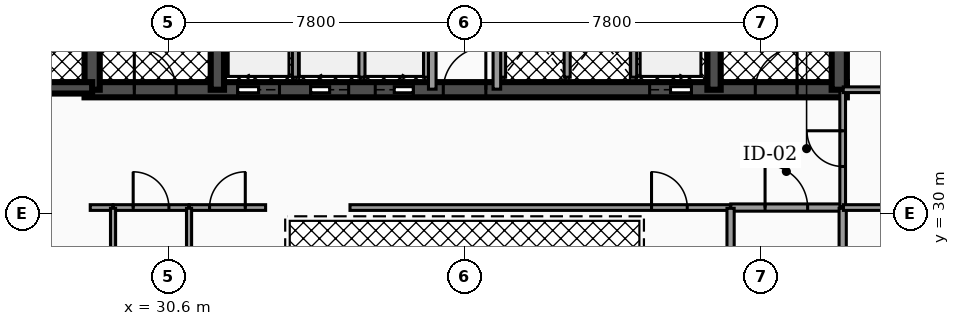
"""IFC4 building model, lengths in metres.
Left out: names, types, materials, properties, quantities, classifications, styles, units other than length and angle.
Written with IfcOpenShell. Run it as: python <this file> out.ifc"""

import sys

from ifc_helpers import new_model, si_unit, direction, frame, frame_2d, origin, place, context, subcontext, project, spatial, rectangle, extrude, element, fill, save


model = new_model("IFC4")
c1 = context("Model", 3, precision=1e-05, world=origin(), true_north=direction((0.0, 1.0)))
c2 = subcontext(c1, "Body", "Model", "MODEL_VIEW")
j1 = project(units=[si_unit("LENGTHUNIT", "METRE"), si_unit("PLANEANGLEUNIT", "RADIAN")], contexts=[c1])
p1 = place(None, origin())
s1 = spatial("IfcSite", under=j1, at=p1, CompositionType="ELEMENT")
p2 = place(p1, origin())
s2 = spatial("IfcBuilding", under=s1, at=p2, CompositionType="ELEMENT")
p3 = place(p2, frame((0.0, 0.0, 127.16)))
s3 = spatial("IfcBuildingStorey", under=s2, at=p3, CompositionType="ELEMENT", Elevation=127.16)
p4 = place(p3, frame((28.4, 33.25, 0.0), z_axis=(0.0, 0.0, 1.0), x_axis=(1.0, 0.0, 0.0)))
e1 = element("IfcWall", 1, at=p4, inside=s3, PredefinedType="SHEAR", context=c2, shape_type="SweptSolid", body=[
    extrude(rectangle(XDim=20.06, YDim=0.4, at=frame_2d((10.03, 0.0))), origin(), (0.0, 0.0, 1.0), 3.5),
])
p5 = place(p4, frame((4.03, 0.0, 0.0)))
e2 = element("IfcOpeningElement", 2, at=p5, cuts=e1, PredefinedType="OPENING", context=c2, shape_type="SweptSolid", body=[
    extrude(rectangle(XDim=1.1, YDim=2.15, at=frame_2d((0.55, 1.075))), frame((0.0, 0.21, 0.0), z_axis=(0.0, -1.0, 0.0), x_axis=(1.0, 0.0, 0.0)), (0.0, 0.0, 1.0), 0.42),
])
p6 = place(p4, frame((14.87, 0.0, 0.0)))
e3 = element("IfcOpeningElement", 3, at=p6, cuts=e1, PredefinedType="OPENING", context=c2, shape_type="SweptSolid", body=[
    extrude(rectangle(XDim=1.1, YDim=2.15, at=frame_2d((0.55, 1.075))), frame((0.0, 0.21, 0.0), z_axis=(0.0, -1.0, 0.0), x_axis=(1.0, 0.0, 0.0)), (0.0, 0.0, 1.0), 0.42),
])
p7 = place(p4, frame((5.95, 0.0, 0.0)))
e4 = element("IfcOpeningElement", 4, at=p7, cuts=e1, PredefinedType="OPENING", context=c2, shape_type="SweptSolid", body=[
    extrude(rectangle(XDim=1.0, YDim=2.1, at=frame_2d((0.5, 1.05))), frame((0.0, 0.21, 0.0), z_axis=(0.0, -1.0, 0.0), x_axis=(1.0, 0.0, 0.0)), (0.0, 0.0, 1.0), 0.42),
])
p8 = place(p4, frame((7.65, 0.0, 0.0)))
e5 = element("IfcOpeningElement", 5, at=p8, cuts=e1, PredefinedType="OPENING", context=c2, shape_type="SweptSolid", body=[
    extrude(rectangle(XDim=1.0, YDim=2.1, at=frame_2d((0.5, 1.05))), frame((0.0, 0.21, 0.0), z_axis=(0.0, -1.0, 0.0), x_axis=(1.0, 0.0, 0.0)), (0.0, 0.0, 1.0), 0.42),
])
p9 = place(p4, frame((1.31, 0.0, 0.0)))
e6 = element("IfcOpeningElement", 6, at=p9, cuts=e1, PredefinedType="OPENING", context=c2, shape_type="SweptSolid", body=[
    extrude(rectangle(XDim=1.1, YDim=2.2, at=frame_2d((0.55, 1.1))), frame((0.0, 0.21, 0.0), z_axis=(0.0, -1.0, 0.0), x_axis=(1.0, 0.0, 0.0)), (0.0, 0.0, 1.0), 0.42),
])
p10 = place(p4, frame((9.44, 0.0, 0.0)))
e7 = element("IfcOpeningElement", 7, at=p10, cuts=e1, PredefinedType="OPENING", context=c2, shape_type="SweptSolid", body=[
    extrude(rectangle(XDim=1.12, YDim=2.05, at=frame_2d((0.56, 1.025))), frame((0.0, 0.21, 0.0), z_axis=(0.0, -1.0, 0.0), x_axis=(1.0, 0.0, 0.0)), (0.0, 0.0, 1.0), 0.42),
])
p11 = place(p4, frame((17.65, 0.0, 0.0)))
e8 = element("IfcOpeningElement", 8, at=p11, cuts=e1, PredefinedType="OPENING", context=c2, shape_type="SweptSolid", body=[
    extrude(rectangle(XDim=1.1, YDim=2.2, at=frame_2d((0.55, 1.1))), frame((0.0, 0.21, 0.0), z_axis=(0.0, -1.0, 0.0), x_axis=(1.0, 0.0, 0.0)), (0.0, 0.0, 1.0), 0.42),
])
p12 = place(p3, frame((28.6, 33.25, 0.0), z_axis=(0.0, 0.0, 1.0), x_axis=(0.0, 1.0, 0.0)))
e9 = element("IfcWall", 9, at=p12, inside=s3, PredefinedType="SHEAR", context=c2, shape_type="SweptSolid", body=[
    extrude(rectangle(XDim=10.2, YDim=0.4, at=frame_2d((5.1, 0.0))), origin(), (0.0, 0.0, 1.0), 3.5),
])
for number, where, z_axis, x_axis in (
    (10, (31.895, 33.25, 0.0), (0.0, 0.0, 1.0), (0.0, 1.0, 0.0)),
    (11, (44.965, 33.25, 0.0), (0.0, 0.0, 1.0), (0.0, 1.0, 0.0)),
):
    element("IfcWall", number, at=place(p3, frame(where, z_axis=z_axis, x_axis=x_axis)), inside=s3, PredefinedType="SHEAR", context=c2, shape_type="SweptSolid", body=[
        extrude(rectangle(XDim=10.2, YDim=0.35, at=frame_2d((5.1, 0.0))), origin(), (0.0, 0.0, 1.0), 3.5),
    ])
p13 = place(p3, frame((48.26, 33.25, 0.0), z_axis=(0.0, 0.0, 1.0), x_axis=(0.0, 1.0, 0.0)))
e12 = element("IfcWall", 12, at=p13, inside=s3, PredefinedType="SHEAR", context=c2, shape_type="SweptSolid", body=[
    extrude(rectangle(XDim=10.2, YDim=0.4, at=frame_2d((5.1, 0.0))), origin(), (0.0, 0.0, 1.0), 3.5),
])
p14 = place(p3, frame((25.08, 33.3, 0.0), z_axis=(0.0, 0.0, 1.0), x_axis=(1.0, 0.0, 0.0)))
e13 = element("IfcWall", 13, at=p14, inside=s3, PredefinedType="SHEAR", context=c2, shape_type="SweptSolid", body=[
    extrude(rectangle(XDim=3.52, YDim=0.3, at=frame_2d((1.76, 0.0))), origin(), (0.0, 0.0, 1.0), 3.5),
])
p15 = place(p14, frame((1.335, 0.0, 0.0)))
e14 = element("IfcOpeningElement", 14, at=p15, cuts=e13, PredefinedType="OPENING", context=c2, shape_type="SweptSolid", body=[
    extrude(rectangle(XDim=0.95, YDim=2.2, at=frame_2d((0.475, 1.1))), frame((0.0, 0.16, 0.0), z_axis=(0.0, -1.0, 0.0), x_axis=(1.0, 0.0, 0.0)), (0.0, 0.0, 1.0), 0.32),
])
for number, where, z_axis, x_axis in (
    (15, (33.95, 33.58, 0.0), (0.0, 0.0, 1.0), (0.0, 1.0, 0.0)),
    (16, (42.85, 33.58, 0.0), (0.0, 0.0, 1.0), (0.0, 1.0, 0.0)),
):
    element("IfcWall", number, at=place(p3, frame(where, z_axis=z_axis, x_axis=x_axis)), inside=s3, PredefinedType="SOLIDWALL", context=c2, shape_type="SweptSolid", body=[
        extrude(rectangle(XDim=2.45, YDim=0.16, at=frame_2d((1.225, 0.0))), origin(), (0.0, 0.0, 1.0), 2.472),
    ])
for number, where, z_axis, x_axis in (
    (17, (35.7, 33.58, 0.0), (0.0, 0.0, 1.0), (0.0, 1.0, 0.0)),
    (18, (37.4, 33.58, 0.0), (0.0, 0.0, 1.0), (0.0, 1.0, 0.0)),
    (19, (39.4, 33.58, 0.0), (0.0, 0.0, 1.0), (0.0, 1.0, 0.0)),
    (20, (41.1, 33.58, 0.0), (0.0, 0.0, 1.0), (0.0, 1.0, 0.0)),
):
    element("IfcWall", number, at=place(p3, frame(where, z_axis=z_axis, x_axis=x_axis)), inside=s3, PredefinedType="SOLIDWALL", context=c2, shape_type="SweptSolid", body=[
        extrude(rectangle(XDim=2.25, YDim=0.16, at=frame_2d((1.125, 0.0))), origin(), (0.0, 0.0, 1.0), 2.472),
    ])
p16 = place(p3, frame((37.55, 33.265, 0.0), z_axis=(0.0, 0.0, 1.0), x_axis=(0.0, 1.0, 0.0)))
e21 = element("IfcWall", 21, at=p16, inside=s3, PredefinedType="PARTITIONING", context=c2, shape_type="SweptSolid", body=[
    extrude(rectangle(XDim=4.265, YDim=0.2, at=frame_2d((2.133, 0.0))), origin(), (0.0, 0.0, 1.0), 2.457),
])
p17 = place(p16, frame((3.093, 0.0, 0.0)))
e22 = element("IfcOpeningElement", 22, at=p17, cuts=e21, PredefinedType="OPENING", context=c2, shape_type="SweptSolid", body=[
    extrude(rectangle(XDim=0.88, YDim=2.05, at=frame_2d((0.44, 1.025))), frame((0.0, 0.11, 0.0), z_axis=(0.0, -1.0, 0.0), x_axis=(1.0, 0.0, 0.0)), (0.0, 0.0, 1.0), 0.22),
])
p18 = place(p3, frame((39.25, 33.265, 0.0), z_axis=(0.0, 0.0, 1.0), x_axis=(0.0, 1.0, 0.0)))
e23 = element("IfcWall", 23, at=p18, inside=s3, PredefinedType="PARTITIONING", context=c2, shape_type="SweptSolid", body=[
    extrude(rectangle(XDim=4.265, YDim=0.2, at=frame_2d((2.133, 0.0))), origin(), (0.0, 0.0, 1.0), 2.457),
])
p19 = place(p18, frame((3.093, 0.0, 0.0)))
e24 = element("IfcOpeningElement", 24, at=p19, cuts=e23, PredefinedType="OPENING", context=c2, shape_type="SweptSolid", body=[
    extrude(rectangle(XDim=0.88, YDim=2.05, at=frame_2d((0.44, 1.025))), frame((0.0, 0.11, 0.0), z_axis=(0.0, -1.0, 0.0), x_axis=(1.0, 0.0, 0.0)), (0.0, 0.0, 1.0), 0.22),
])
p20 = place(p3, frame((45.405, 30.15, 0.0), z_axis=(0.0, 0.0, 1.0), x_axis=(1.0, 0.0, 0.0)))
e25 = element("IfcWall", 25, at=p20, inside=s3, PredefinedType="PARTITIONING", context=c2, shape_type="SweptSolid", body=[
    extrude(rectangle(XDim=2.925, YDim=0.19, at=frame_2d((1.462, 0.0))), origin(), (0.0, 0.0, 1.0), 2.457),
])
p21 = place(p20, frame((0.903, 0.0, 0.0)))
e26 = element("IfcOpeningElement", 26, at=p21, cuts=e25, PredefinedType="OPENING", context=c2, shape_type="SweptSolid", body=[
    extrude(rectangle(XDim=1.12, YDim=2.05, at=frame_2d((0.56, 1.025))), frame((0.0, 0.105, 0.0), z_axis=(0.0, -1.0, 0.0), x_axis=(1.0, 0.0, 0.0)), (0.0, 0.0, 1.0), 0.21),
])
p22 = place(p3, frame((48.35, 30.17, 0.0), z_axis=(0.0, 0.0, 1.0), x_axis=(0.0, 1.0, 0.0)))
e27 = element("IfcWall", 27, at=p22, inside=s3, PredefinedType="PARTITIONING", context=c2, shape_type="SweptSolid", body=[
    extrude(rectangle(XDim=3.06, YDim=0.15, at=frame_2d((1.53, 0.0))), origin(), (0.0, 0.0, 1.0), 2.457),
])
p23 = place(p22, frame((1.06, 0.0, 0.0)))
e28 = element("IfcOpeningElement", 28, at=p23, cuts=e27, PredefinedType="OPENING", context=c2, shape_type="SweptSolid", body=[
    extrude(rectangle(XDim=0.94, YDim=2.05, at=frame_2d((0.47, 1.025))), frame((0.0, 0.085, 0.0), z_axis=(0.0, -1.0, 0.0), x_axis=(1.0, 0.0, 0.0)), (0.0, 0.0, 1.0), 0.17),
])
p24 = place(p3, frame((28.55, 30.15, 0.0), z_axis=(0.0, 0.0, 1.0), x_axis=(1.0, 0.0, 0.0)))
e29 = element("IfcWall", 29, at=p24, inside=s3, PredefinedType="PARTITIONING", context=c2, shape_type="SweptSolid", body=[
    extrude(rectangle(XDim=0.595, YDim=0.15, at=frame_2d((0.297, 0.0))), origin(), (0.0, 0.0, 1.0), 2.457),
])
p25 = place(p3, frame((29.155, 30.15, 0.0), z_axis=(0.0, 0.0, 1.0), x_axis=(1.0, 0.0, 0.0)))
e30 = element("IfcWall", 30, at=p25, inside=s3, PredefinedType="PARTITIONING", context=c2, shape_type="SweptSolid", body=[
    extrude(rectangle(XDim=1.99, YDim=0.15, at=frame_2d((0.995, 0.0))), origin(), (0.0, 0.0, 1.0), 2.457),
])
p26 = place(p25, frame((0.525, 0.0, 0.0)))
e31 = element("IfcOpeningElement", 31, at=p26, cuts=e30, PredefinedType="OPENING", context=c2, shape_type="SweptSolid", body=[
    extrude(rectangle(XDim=0.94, YDim=2.05, at=frame_2d((0.47, 1.025))), frame((0.0, 0.085, 0.0), z_axis=(0.0, -1.0, 0.0), x_axis=(1.0, 0.0, 0.0)), (0.0, 0.0, 1.0), 0.17),
])
p27 = place(p3, frame((31.155, 30.15, 0.0), z_axis=(0.0, 0.0, 1.0), x_axis=(1.0, 0.0, 0.0)))
e32 = element("IfcWall", 32, at=p27, inside=s3, PredefinedType="PARTITIONING", context=c2, shape_type="SweptSolid", body=[
    extrude(rectangle(XDim=2.01, YDim=0.15, at=frame_2d((1.005, 0.0))), origin(), (0.0, 0.0, 1.0), 2.457),
])
p28 = place(p27, frame((0.535, 0.0, 0.0)))
e33 = element("IfcOpeningElement", 33, at=p28, cuts=e32, PredefinedType="OPENING", context=c2, shape_type="SweptSolid", body=[
    extrude(rectangle(XDim=0.94, YDim=2.05, at=frame_2d((0.47, 1.025))), frame((0.0, 0.085, 0.0), z_axis=(0.0, -1.0, 0.0), x_axis=(1.0, 0.0, 0.0)), (0.0, 0.0, 1.0), 0.17),
])
p29 = place(p3, frame((35.385, 30.15, 0.0), z_axis=(0.0, 0.0, 1.0), x_axis=(1.0, 0.0, 0.0)))
e34 = element("IfcWall", 34, at=p29, inside=s3, PredefinedType="PARTITIONING", context=c2, shape_type="SweptSolid", body=[
    extrude(rectangle(XDim=10.01, YDim=0.15, at=frame_2d((5.005, 0.0))), origin(), (0.0, 0.0, 1.0), 2.457),
])
p30 = place(p29, frame((7.935, 0.0, 0.0)))
e35 = element("IfcOpeningElement", 35, at=p30, cuts=e34, PredefinedType="OPENING", context=c2, shape_type="SweptSolid", body=[
    extrude(rectangle(XDim=0.94, YDim=2.05, at=frame_2d((0.47, 1.025))), frame((0.0, 0.085, 0.0), z_axis=(0.0, -1.0, 0.0), x_axis=(1.0, 0.0, 0.0)), (0.0, 0.0, 1.0), 0.17),
])
for number, where, z_axis, x_axis in (
    (36, (45.4, 27.37, 0.0), (0.0, 0.0, 1.0), (0.0, 1.0, 0.0)),
    (37, (48.35, 27.37, 0.0), (0.0, 0.0, 1.0), (0.0, 1.0, 0.0)),
):
    element("IfcWall", number, at=place(p3, frame(where, z_axis=z_axis, x_axis=x_axis)), inside=s3, PredefinedType="PARTITIONING", context=c2, shape_type="SweptSolid", body=[
        extrude(rectangle(XDim=2.76, YDim=0.19, at=frame_2d((1.38, 0.0))), origin(), (0.0, 0.0, 1.0), 2.457),
    ])
p31 = place(p3, frame((48.37, 30.15, 0.0), z_axis=(0.0, 0.0, 1.0), x_axis=(1.0, 0.0, 0.0)))
e38 = element("IfcWall", 38, at=p31, inside=s3, PredefinedType="PARTITIONING", context=c2, shape_type="SweptSolid", body=[
    extrude(rectangle(XDim=3.26, YDim=0.15, at=frame_2d((1.63, 0.0))), origin(), (0.0, 0.0, 1.0), 2.457),
])
p32 = place(p31, frame((1.16, 0.0, 0.0)))
e39 = element("IfcOpeningElement", 39, at=p32, cuts=e38, PredefinedType="OPENING", context=c2, shape_type="SweptSolid", body=[
    extrude(rectangle(XDim=0.94, YDim=2.05, at=frame_2d((0.47, 1.025))), frame((0.0, 0.085, 0.0), z_axis=(0.0, -1.0, 0.0), x_axis=(1.0, 0.0, 0.0)), (0.0, 0.0, 1.0), 0.17),
])
p33 = place(p3, frame((48.365, 33.25, 0.0), z_axis=(0.0, 0.0, 1.0), x_axis=(1.0, 0.0, 0.0)))
e40 = element("IfcWall", 40, at=p33, inside=s3, PredefinedType="PARTITIONING", context=c2, shape_type="SweptSolid", body=[
    extrude(rectangle(XDim=3.265, YDim=0.15, at=frame_2d((1.632, 0.0))), origin(), (0.0, 0.0, 1.0), 2.457),
])
p34 = place(p3, frame((29.15, 27.17, 0.0), z_axis=(0.0, 0.0, 1.0), x_axis=(0.0, 1.0, 0.0)))
e41 = element("IfcWall", 41, at=p34, inside=s3, PredefinedType="PARTITIONING", context=c2, shape_type="SweptSolid", body=[
    extrude(rectangle(XDim=2.96, YDim=0.135, at=frame_2d((1.48, 0.0))), origin(), (0.0, 0.0, 1.0), 2.457),
])
p35 = place(p34, frame((1.05, 0.0, 0.0)))
e42 = element("IfcOpeningElement", 42, at=p35, cuts=e41, PredefinedType="OPENING", context=c2, shape_type="SweptSolid", body=[
    extrude(rectangle(XDim=0.86, YDim=2.05, at=frame_2d((0.43, 1.025))), frame((0.0, 0.077, 0.0), z_axis=(0.0, -1.0, 0.0), x_axis=(1.0, 0.0, 0.0)), (0.0, 0.0, 1.0), 0.155),
])
p36 = place(p3, frame((31.15, 27.17, 0.0), z_axis=(0.0, 0.0, 1.0), x_axis=(0.0, 1.0, 0.0)))
e43 = element("IfcWall", 43, at=p36, inside=s3, PredefinedType="PARTITIONING", context=c2, shape_type="SweptSolid", body=[
    extrude(rectangle(XDim=2.96, YDim=0.135, at=frame_2d((1.48, 0.0))), origin(), (0.0, 0.0, 1.0), 2.457),
])
p37 = place(p5, origin())
e44 = element("IfcDoor", 44, at=p37, inside=s3, OperationType="SLIDING_TO_LEFT", PredefinedType="DOOR", context=c2, shape_type="SweptSolid", body=[
    extrude(rectangle(XDim=1.1, YDim=2.15, at=frame_2d((0.55, 1.075))), frame((0.0, 0.025, 0.0), z_axis=(0.0, -1.0, 0.0), x_axis=(1.0, 0.0, 0.0)), (0.0, 0.0, 1.0), 0.05),
])
fill(e2, e44)
p38 = place(p6, origin())
e45 = element("IfcDoor", 45, at=p38, inside=s3, OperationType="SLIDING_TO_RIGHT", PredefinedType="DOOR", context=c2, shape_type="SweptSolid", body=[
    extrude(rectangle(XDim=1.1, YDim=2.15, at=frame_2d((0.55, 1.075))), frame((0.0, 0.025, 0.0), z_axis=(0.0, -1.0, 0.0), x_axis=(1.0, 0.0, 0.0)), (0.0, 0.0, 1.0), 0.05),
])
fill(e3, e45)
p39 = place(p7, origin())
e46 = element("IfcDoor", 46, at=p39, inside=s3, OperationType="SLIDING_TO_LEFT", PredefinedType="DOOR", context=c2, shape_type="SweptSolid", body=[
    extrude(rectangle(XDim=1.0, YDim=2.1, at=frame_2d((0.5, 1.05))), frame((0.0, 0.025, 0.0), z_axis=(0.0, -1.0, 0.0), x_axis=(1.0, 0.0, 0.0)), (0.0, 0.0, 1.0), 0.05),
])
fill(e4, e46)
p40 = place(p8, origin())
e47 = element("IfcDoor", 47, at=p40, inside=s3, OperationType="SLIDING_TO_RIGHT", PredefinedType="DOOR", context=c2, shape_type="SweptSolid", body=[
    extrude(rectangle(XDim=1.0, YDim=2.1, at=frame_2d((0.5, 1.05))), frame((0.0, 0.025, 0.0), z_axis=(0.0, -1.0, 0.0), x_axis=(1.0, 0.0, 0.0)), (0.0, 0.0, 1.0), 0.05),
])
fill(e5, e47)
p41 = place(p9, origin())
e48 = element("IfcDoor", 48, at=p41, inside=s3, OperationType="SINGLE_SWING_LEFT", PredefinedType="DOOR", context=c2, shape_type="SweptSolid", body=[
    extrude(rectangle(XDim=1.1, YDim=2.2, at=frame_2d((0.55, 1.1))), frame((0.0, 0.025, 0.0), z_axis=(0.0, -1.0, 0.0), x_axis=(1.0, 0.0, 0.0)), (0.0, 0.0, 1.0), 0.05),
])
fill(e6, e48)
p42 = place(p10, origin())
e49 = element("IfcDoor", 49, at=p42, inside=s3, OperationType="SINGLE_SWING_RIGHT", PredefinedType="DOOR", context=c2, shape_type="SweptSolid", body=[
    extrude(rectangle(XDim=1.12, YDim=2.05, at=frame_2d((0.56, 1.025))), frame((0.0, 0.025, 0.0), z_axis=(0.0, -1.0, 0.0), x_axis=(1.0, 0.0, 0.0)), (0.0, 0.0, 1.0), 0.05),
])
fill(e7, e49)
p43 = place(p11, origin())
e50 = element("IfcDoor", 50, at=p43, inside=s3, OperationType="SINGLE_SWING_RIGHT", PredefinedType="DOOR", context=c2, shape_type="SweptSolid", body=[
    extrude(rectangle(XDim=1.1, YDim=2.2, at=frame_2d((0.55, 1.1))), frame((0.0, 0.025, 0.0), z_axis=(0.0, -1.0, 0.0), x_axis=(1.0, 0.0, 0.0)), (0.0, 0.0, 1.0), 0.05),
])
fill(e8, e50)
p44 = place(p21, origin())
e51 = element("IfcDoor", 51, at=p44, inside=s3, OperationType="SINGLE_SWING_LEFT", PredefinedType="DOOR", context=c2, shape_type="SweptSolid", body=[
    extrude(rectangle(XDim=1.12, YDim=2.05, at=frame_2d((0.56, 1.025))), frame((0.0, 0.025, 0.0), z_axis=(0.0, -1.0, 0.0), x_axis=(1.0, 0.0, 0.0)), (0.0, 0.0, 1.0), 0.05),
])
fill(e26, e51)
p45 = place(p23, origin())
e52 = element("IfcDoor", 52, at=p45, inside=s3, OperationType="SINGLE_SWING_RIGHT", PredefinedType="DOOR", context=c2, shape_type="SweptSolid", body=[
    extrude(rectangle(XDim=0.94, YDim=2.05, at=frame_2d((0.47, 1.025))), frame((0.0, 0.025, 0.0), z_axis=(0.0, -1.0, 0.0), x_axis=(1.0, 0.0, 0.0)), (0.0, 0.0, 1.0), 0.05),
])
fill(e28, e52)
p46 = place(p26, origin())
e53 = element("IfcDoor", 53, at=p46, inside=s3, OperationType="SINGLE_SWING_LEFT", PredefinedType="DOOR", context=c2, shape_type="SweptSolid", body=[
    extrude(rectangle(XDim=0.94, YDim=2.05, at=frame_2d((0.47, 1.025))), frame((0.0, 0.025, 0.0), z_axis=(0.0, -1.0, 0.0), x_axis=(1.0, 0.0, 0.0)), (0.0, 0.0, 1.0), 0.05),
])
fill(e31, e53)
p47 = place(p28, origin())
e54 = element("IfcDoor", 54, at=p47, inside=s3, OperationType="SINGLE_SWING_RIGHT", PredefinedType="DOOR", context=c2, shape_type="SweptSolid", body=[
    extrude(rectangle(XDim=0.94, YDim=2.05, at=frame_2d((0.47, 1.025))), frame((0.0, 0.025, 0.0), z_axis=(0.0, -1.0, 0.0), x_axis=(1.0, 0.0, 0.0)), (0.0, 0.0, 1.0), 0.05),
])
fill(e33, e54)
p48 = place(p30, origin())
e55 = element("IfcDoor", 55, at=p48, inside=s3, OperationType="SINGLE_SWING_LEFT", PredefinedType="DOOR", context=c2, shape_type="SweptSolid", body=[
    extrude(rectangle(XDim=0.94, YDim=2.05, at=frame_2d((0.47, 1.025))), frame((0.0, 0.025, 0.0), z_axis=(0.0, -1.0, 0.0), x_axis=(1.0, 0.0, 0.0)), (0.0, 0.0, 1.0), 0.05),
])
fill(e35, e55)
save(model, sys.argv[1])
